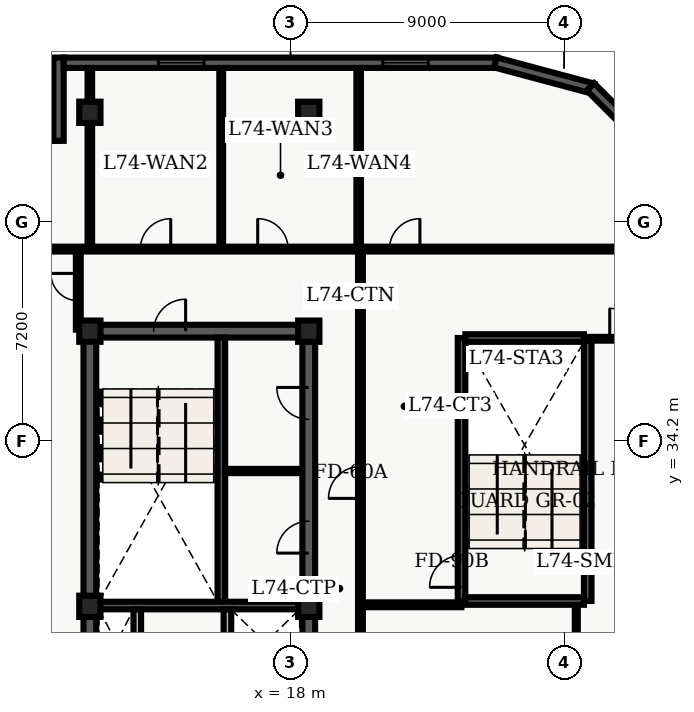
"""IFC4 building model, lengths in metres.
Left out: names, types, materials, properties, quantities, classifications, styles, units other than length and angle.
Written with IfcOpenShell. Run it as: python <this file> out.ifc"""

import sys

from ifc_helpers import new_model, entity, si_unit, converted_unit, direction, frame, origin_with_axes, origin_2d_with_axis, place, context, subcontext, project, spatial, polyline, rectangle, outline, extrude, element, fill, save


model = new_model("IFC4")
c1 = context("Model", 3, precision=1e-05, world=origin_with_axes(), true_north=direction((0.0, 1.0)))
c2 = subcontext(c1, "Body", "Model", "MODEL_VIEW")
j1 = project(units=[si_unit("LENGTHUNIT", "METRE"), converted_unit("PLANEANGLEUNIT", "DEGREE", entity("IfcPlaneAngleMeasure", 0.017), si_unit("PLANEANGLEUNIT", "RADIAN"), dimensions=[0, 0, 0, 0, 0, 0, 0])], contexts=[c1])
p1 = place(None, origin_with_axes())
s1 = spatial("IfcSite", under=j1, at=p1, CompositionType="ELEMENT")
p2 = place(p1, origin_with_axes())
s2 = spatial("IfcBuilding", under=s1, at=p2, CompositionType="ELEMENT")
p3 = place(p2, frame((0.0, 0.0, 299.7), z_axis=(0.0, 0.0, 1.0), x_axis=(1.0, 0.0, 0.0)))
s3 = spatial("IfcBuildingStorey", under=s2, at=p3, CompositionType="ELEMENT", Elevation=299.7)
p4 = place(p3, frame((11.4, 10.8, 0.0), z_axis=(0.0, 0.0, 1.0), x_axis=(0.0, 1.0, 0.0)))
e1 = element("IfcWall", 1, at=p4, inside=s3, PredefinedType="SHEAR", context=c2, shape_type="SweptSolid", body=[
    extrude(outline(polyline([(0.0, -0.21), (27.0, -0.21), (27.0, 0.21), (0.0, 0.21), (0.0, -0.21)])), origin_with_axes(), (0.0, 0.0, 1.0), 3.6),
])
p5 = place(p3, frame((11.4, 37.8, 0.0), z_axis=(0.0, 0.0, 1.0), x_axis=(1.0, 0.0, 0.0)))
e2 = element("IfcWall", 2, at=p5, inside=s3, PredefinedType="SHEAR", context=c2, shape_type="SweptSolid", body=[
    extrude(outline(polyline([(0.0, -0.21), (7.2, -0.21), (7.2, 0.21), (0.0, 0.21), (0.0, -0.21)])), origin_with_axes(), (0.0, 0.0, 1.0), 3.6),
])
p6 = place(p5, frame((2.625, 0.0, 0.0), z_axis=(0.0, 0.0, 1.0), x_axis=(1.0, 0.0, 0.0)))
e3 = element("IfcOpeningElement", 3, at=p6, cuts=e2, PredefinedType="OPENING", context=c2, shape_type="SweptSolid", body=[
    extrude(rectangle(XDim=1.05, YDim=0.44, at=origin_2d_with_axis()), origin_with_axes(), (0.0, 0.0, 1.0), 2.15),
])
p7 = place(p3, frame((18.6, 24.3, 0.0), z_axis=(0.0, 0.0, 1.0), x_axis=(0.0, 1.0, 0.0)))
e4 = element("IfcWall", 4, at=p7, inside=s3, PredefinedType="SHEAR", context=c2, shape_type="SweptSolid", body=[
    extrude(outline(polyline([(0.0, -0.21), (13.5, -0.21), (13.5, 0.21), (0.0, 0.21), (0.0, -0.21)])), origin_with_axes(), (0.0, 0.0, 1.0), 3.6),
])
p8 = place(p7, frame((6.725, 0.0, 0.0), z_axis=(0.0, 0.0, 1.0), x_axis=(1.0, 0.0, 0.0)))
e5 = element("IfcOpeningElement", 5, at=p8, cuts=e4, PredefinedType="OPENING", context=c2, shape_type="SweptSolid", body=[
    extrude(rectangle(XDim=1.05, YDim=0.44, at=origin_2d_with_axis()), origin_with_axes(), (0.0, 0.0, 1.0), 2.15),
])
p9 = place(p7, frame((11.125, 0.0, 0.0), z_axis=(0.0, 0.0, 1.0), x_axis=(1.0, 0.0, 0.0)))
e6 = element("IfcOpeningElement", 6, at=p9, cuts=e4, PredefinedType="OPENING", context=c2, shape_type="SweptSolid", body=[
    extrude(rectangle(XDim=1.05, YDim=0.44, at=origin_2d_with_axis()), origin_with_axes(), (0.0, 0.0, 1.0), 2.15),
])
p10 = place(p3, frame((15.725, 28.9, 0.0), z_axis=(0.0, 0.0, 1.0), x_axis=(0.0, 1.0, 0.0)))
e7 = element("IfcWall", 7, at=p10, inside=s3, PredefinedType="SHEAR", context=c2, shape_type="SweptSolid", body=[
    extrude(outline(polyline([(0.0, -0.125), (8.69, -0.125), (8.69, 0.125), (0.0, 0.125), (0.0, -0.125)])), origin_with_axes(), (0.0, 0.0, 1.0), 3.6),
])
p11 = place(p3, frame((11.61, 28.775, 0.0), z_axis=(0.0, 0.0, 1.0), x_axis=(1.0, 0.0, 0.0)))
e8 = element("IfcWall", 8, at=p11, inside=s3, PredefinedType="SHEAR", context=c2, shape_type="SweptSolid", body=[
    extrude(outline(polyline([(0.0, -0.125), (6.78, -0.125), (6.78, 0.125), (0.0, 0.125), (0.0, -0.125)])), origin_with_axes(), (0.0, 0.0, 1.0), 3.6),
])
for number, where, z_axis, x_axis in (
    (9, (12.96, 26.45, 0.0), (0.0, 0.0, 1.0), (0.0, 1.0, 0.0)),
    (10, (15.925, 26.45, 0.0), (0.0, 0.0, 1.0), (0.0, 1.0, 0.0)),
):
    element("IfcWall", number, at=place(p3, frame(where, z_axis=z_axis, x_axis=x_axis)), inside=s3, PredefinedType="SOLIDWALL", context=c2, shape_type="SweptSolid", body=[
        extrude(outline(polyline([(0.0, -0.125), (2.2, -0.125), (2.2, 0.125), (0.0, 0.125), (0.0, -0.125)])), origin_with_axes(), (0.0, 0.0, 1.0), 2.64),
    ])
p12 = place(p3, frame((23.625, 28.925, 0.0), z_axis=(0.0, 0.0, 1.0), x_axis=(0.0, 1.0, 0.0)))
e11 = element("IfcWall", 11, at=p12, inside=s3, PredefinedType="SHEAR", context=c2, shape_type="SweptSolid", body=[
    extrude(outline(polyline([(0.0, -0.125), (8.65, -0.125), (8.65, 0.125), (0.0, 0.125), (0.0, -0.125)])), origin_with_axes(), (0.0, 0.0, 1.0), 3.6),
])
p13 = place(p12, frame((0.975, 0.0, 0.0), z_axis=(0.0, 0.0, 1.0), x_axis=(1.0, 0.0, 0.0)))
e12 = element("IfcOpeningElement", 12, at=p13, cuts=e11, PredefinedType="OPENING", context=c2, shape_type="SweptSolid", body=[
    extrude(rectangle(XDim=1.05, YDim=0.27, at=origin_2d_with_axis()), origin_with_axes(), (0.0, 0.0, 1.0), 2.15),
])
p14 = place(p3, frame((27.775, 28.925, 0.0), z_axis=(0.0, 0.0, 1.0), x_axis=(0.0, 1.0, 0.0)))
e13 = element("IfcWall", 13, at=p14, inside=s3, PredefinedType="SHEAR", context=c2, shape_type="SweptSolid", body=[
    extrude(outline(polyline([(0.0, -0.125), (8.65, -0.125), (8.65, 0.125), (0.0, 0.125), (0.0, -0.125)])), origin_with_axes(), (0.0, 0.0, 1.0), 3.6),
])
for number, where, z_axis, x_axis in (
    (14, (23.75, 28.925, 0.0), (0.0, 0.0, 1.0), (1.0, 0.0, 0.0)),
    (15, (23.75, 37.575, 0.0), (0.0, 0.0, 1.0), (1.0, 0.0, 0.0)),
):
    element("IfcWall", number, at=place(p3, frame(where, z_axis=z_axis, x_axis=x_axis)), inside=s3, PredefinedType="SHEAR", context=c2, shape_type="SweptSolid", body=[
        extrude(outline(polyline([(0.0, -0.125), (3.9, -0.125), (3.9, 0.125), (0.0, 0.125), (0.0, -0.125)])), origin_with_axes(), (0.0, 0.0, 1.0), 3.6),
    ])
for number, where, z_axis, x_axis in (
    (16, (11.4, 28.75, 0.0), (0.0, 0.0, 1.0), (1.0, 0.0, 0.0)),
    (17, (11.4, 37.8, 0.0), (0.0, 0.0, 1.0), (1.0, 0.0, 0.0)),
    (18, (11.4, 45.0, 0.0), (0.0, 0.0, 1.0), (1.0, 0.0, 0.0)),
    (19, (18.6, 28.75, 0.0), (0.0, 0.0, 1.0), (1.0, 0.0, 0.0)),
    (20, (18.6, 37.8, 0.0), (0.0, 0.0, 1.0), (1.0, 0.0, 0.0)),
    (21, (18.6, 45.0, 0.0), (0.0, 0.0, 1.0), (1.0, 0.0, 0.0)),
):
    element("IfcColumn", number, at=place(p3, frame(where, z_axis=z_axis, x_axis=x_axis)), inside=s3, PredefinedType="COLUMN", context=c2, shape_type="SweptSolid", body=[
        extrude(rectangle(XDim=0.7, YDim=0.7, at=origin_2d_with_axis()), origin_with_axes(), (0.0, 0.0, 1.0), 3.9),
    ])
p15 = place(p3, frame((15.84, 33.2, 0.0), z_axis=(0.0, 0.0, 1.0), x_axis=(1.0, 0.0, 0.0)))
e22 = element("IfcWall", 22, at=p15, inside=s3, PredefinedType="PARTITIONING", context=c2, shape_type="SweptSolid", body=[
    extrude(outline(polyline([(0.0, -0.07), (2.46, -0.07), (2.46, 0.07), (0.0, 0.07), (0.0, -0.07)])), origin_with_axes(), (0.0, 0.0, 1.0), 2.64),
])
p16 = place(p3, frame((8.135, 40.5, 0.0), z_axis=(0.0, 0.0, 1.0), x_axis=(1.0, 0.0, 0.0)))
e23 = element("IfcWall", 23, at=p16, inside=s3, PredefinedType="PARTITIONING", context=c2, shape_type="SweptSolid", body=[
    extrude(outline(polyline([(0.0, -0.08), (22.715, -0.08), (22.715, 0.08), (0.0, 0.08), (0.0, -0.08)])), origin_with_axes(), (0.0, 0.0, 1.0), 2.64),
])
p17 = place(p16, frame((1.08, 0.0, 0.0), z_axis=(0.0, 0.0, 1.0), x_axis=(1.0, 0.0, 0.0)))
e24 = element("IfcOpeningElement", 24, at=p17, cuts=e23, PredefinedType="OPENING", context=c2, shape_type="SweptSolid", body=[
    extrude(rectangle(XDim=0.9, YDim=0.18, at=origin_2d_with_axis()), origin_with_axes(), (0.0, 0.0, 1.0), 2.15),
])
p18 = place(p16, frame((5.425, 0.0, 0.0), z_axis=(0.0, 0.0, 1.0), x_axis=(1.0, 0.0, 0.0)))
e25 = element("IfcOpeningElement", 25, at=p18, cuts=e23, PredefinedType="OPENING", context=c2, shape_type="SweptSolid", body=[
    extrude(rectangle(XDim=1.0, YDim=0.18, at=origin_2d_with_axis()), origin_with_axes(), (0.0, 0.0, 1.0), 2.15),
])
p19 = place(p16, frame((9.286, 0.0, 0.0), z_axis=(0.0, 0.0, 1.0), x_axis=(1.0, 0.0, 0.0)))
e26 = element("IfcOpeningElement", 26, at=p19, cuts=e23, PredefinedType="OPENING", context=c2, shape_type="SweptSolid", body=[
    extrude(rectangle(XDim=1.0, YDim=0.18, at=origin_2d_with_axis()), origin_with_axes(), (0.0, 0.0, 1.0), 2.15),
])
p20 = place(p16, frame((13.621, 0.0, 0.0), z_axis=(0.0, 0.0, 1.0), x_axis=(1.0, 0.0, 0.0)))
e27 = element("IfcOpeningElement", 27, at=p20, cuts=e23, PredefinedType="OPENING", context=c2, shape_type="SweptSolid", body=[
    extrude(rectangle(XDim=1.0, YDim=0.18, at=origin_2d_with_axis()), origin_with_axes(), (0.0, 0.0, 1.0), 2.15),
])
p21 = place(p3, frame((20.3, 2.14, 0.0), z_axis=(0.0, 0.0, 1.0), x_axis=(0.0, 1.0, 0.0)))
e28 = element("IfcWall", 28, at=p21, inside=s3, PredefinedType="PARTITIONING", context=c2, shape_type="SweptSolid", body=[
    extrude(outline(polyline([(0.0, -0.08), (38.36, -0.08), (38.36, 0.08), (0.0, 0.08), (0.0, -0.08)])), origin_with_axes(), (0.0, 0.0, 1.0), 2.64),
])
p22 = place(p21, frame((30.685, 0.0, 0.0), z_axis=(0.0, 0.0, 1.0), x_axis=(1.0, 0.0, 0.0)))
e29 = element("IfcOpeningElement", 29, at=p22, cuts=e28, PredefinedType="OPENING", context=c2, shape_type="SweptSolid", body=[
    extrude(rectangle(XDim=1.05, YDim=0.18, at=origin_2d_with_axis()), origin_with_axes(), (0.0, 0.0, 1.0), 2.15),
])
p23 = place(p21, frame((2.683, 0.0, 0.0), z_axis=(0.0, 0.0, 1.0), x_axis=(1.0, 0.0, 0.0)))
e30 = element("IfcOpeningElement", 30, at=p23, cuts=e28, PredefinedType="OPENING", context=c2, shape_type="SweptSolid", body=[
    extrude(rectangle(XDim=1.0, YDim=0.18, at=origin_2d_with_axis()), origin_with_axes(), (0.0, 0.0, 1.0), 2.15),
])
p24 = place(p21, frame((9.919, 0.0, 0.0), z_axis=(0.0, 0.0, 1.0), x_axis=(1.0, 0.0, 0.0)))
e31 = element("IfcOpeningElement", 31, at=p24, cuts=e28, PredefinedType="OPENING", context=c2, shape_type="SweptSolid", body=[
    extrude(rectangle(XDim=1.0, YDim=0.18, at=origin_2d_with_axis()), origin_with_axes(), (0.0, 0.0, 1.0), 2.15),
])
p25 = place(p21, frame((14.175, 0.0, 0.0), z_axis=(0.0, 0.0, 1.0), x_axis=(1.0, 0.0, 0.0)))
e32 = element("IfcOpeningElement", 32, at=p25, cuts=e28, PredefinedType="OPENING", context=c2, shape_type="SweptSolid", body=[
    extrude(rectangle(XDim=1.0, YDim=0.18, at=origin_2d_with_axis()), origin_with_axes(), (0.0, 0.0, 1.0), 2.15),
])
p26 = place(p21, frame((23.364, 0.0, 0.0), z_axis=(0.0, 0.0, 1.0), x_axis=(1.0, 0.0, 0.0)))
e33 = element("IfcOpeningElement", 33, at=p26, cuts=e28, PredefinedType="OPENING", context=c2, shape_type="SweptSolid", body=[
    extrude(rectangle(XDim=1.0, YDim=0.18, at=origin_2d_with_axis()), origin_with_axes(), (0.0, 0.0, 1.0), 2.15),
])
p27 = place(p3, frame((20.3, 28.8, 0.0), z_axis=(0.0, 0.0, 1.0), x_axis=(1.0, 0.0, 0.0)))
e34 = element("IfcWall", 34, at=p27, inside=s3, PredefinedType="PARTITIONING", context=c2, shape_type="SweptSolid", body=[
    extrude(outline(polyline([(0.0, -0.08), (3.32, -0.08), (3.32, 0.08), (0.0, 0.08), (0.0, -0.08)])), origin_with_axes(), (0.0, 0.0, 1.0), 2.64),
])
p28 = place(p3, frame((11.02, 37.85, 0.0), z_axis=(0.0, 0.0, 1.0), x_axis=(0.0, 1.0, 0.0)))
e35 = element("IfcWall", 35, at=p28, inside=s3, PredefinedType="PARTITIONING", context=c2, shape_type="SweptSolid", body=[
    extrude(outline(polyline([(0.0, -0.08), (2.65, -0.08), (2.65, 0.08), (0.0, 0.08), (0.0, -0.08)])), origin_with_axes(), (0.0, 0.0, 1.0), 2.64),
])
p29 = place(p28, frame((1.4, 0.0, 0.0), z_axis=(0.0, 0.0, 1.0), x_axis=(1.0, 0.0, 0.0)))
e36 = element("IfcOpeningElement", 36, at=p29, cuts=e35, PredefinedType="OPENING", context=c2, shape_type="SweptSolid", body=[
    extrude(rectangle(XDim=0.9, YDim=0.18, at=origin_2d_with_axis()), origin_with_axes(), (0.0, 0.0, 1.0), 2.15),
])
p30 = place(p3, frame((11.4, 40.6, 0.0), z_axis=(0.0, 0.0, 1.0), x_axis=(0.0, 1.0, 0.0)))
e37 = element("IfcWall", 37, at=p30, inside=s3, PredefinedType="PARTITIONING", context=c2, shape_type="SweptSolid", body=[
    extrude(outline(polyline([(0.0, -0.075), (5.865, -0.075), (5.865, 0.075), (0.0, 0.075), (0.0, -0.075)])), origin_with_axes(), (0.0, 0.0, 1.0), 2.64),
])
p31 = place(p3, frame((15.72, 40.6, 0.0), z_axis=(0.0, 0.0, 1.0), x_axis=(0.0, 1.0, 0.0)))
e38 = element("IfcWall", 38, at=p31, inside=s3, PredefinedType="PARTITIONING", context=c2, shape_type="SweptSolid", body=[
    extrude(outline(polyline([(0.0, -0.062), (5.865, -0.062), (5.865, 0.062), (0.0, 0.062), (0.0, -0.062)])), origin_with_axes(), (0.0, 0.0, 1.0), 2.64),
])
p32 = place(p3, frame((20.242, 40.6, 0.0), z_axis=(0.0, 0.0, 1.0), x_axis=(0.0, 1.0, 0.0)))
e39 = element("IfcWall", 39, at=p32, inside=s3, PredefinedType="PARTITIONING", context=c2, shape_type="SweptSolid", body=[
    extrude(outline(polyline([(0.0, -0.075), (5.865, -0.075), (5.865, 0.075), (0.0, 0.075), (0.0, -0.075)])), origin_with_axes(), (0.0, 0.0, 1.0), 2.64),
])
p33 = place(p3, frame((27.4, 2.135, 0.0), z_axis=(0.0, 0.0, 1.0), x_axis=(0.0, 1.0, 0.0)))
e40 = element("IfcWall", 40, at=p33, inside=s3, PredefinedType="PARTITIONING", context=c2, shape_type="SweptSolid", body=[
    extrude(outline(polyline([(0.0, -0.05), (26.515, -0.05), (26.515, 0.05), (0.0, 0.05), (0.0, -0.05)])), origin_with_axes(), (0.0, 0.0, 1.0), 2.64),
])
p34 = place(p33, frame((2.408, 0.0, 0.0), z_axis=(0.0, 0.0, 1.0), x_axis=(1.0, 0.0, 0.0)))
e41 = element("IfcOpeningElement", 41, at=p34, cuts=e40, PredefinedType="OPENING", context=c2, shape_type="SweptSolid", body=[
    extrude(rectangle(XDim=0.95, YDim=0.12, at=origin_2d_with_axis()), origin_with_axes(), (0.0, 0.0, 1.0), 2.15),
])
p35 = place(p33, frame((6.894, 0.0, 0.0), z_axis=(0.0, 0.0, 1.0), x_axis=(1.0, 0.0, 0.0)))
e42 = element("IfcOpeningElement", 42, at=p35, cuts=e40, PredefinedType="OPENING", context=c2, shape_type="SweptSolid", body=[
    extrude(rectangle(XDim=0.95, YDim=0.12, at=origin_2d_with_axis()), origin_with_axes(), (0.0, 0.0, 1.0), 2.15),
])
p36 = place(p33, frame((13.901, 0.0, 0.0), z_axis=(0.0, 0.0, 1.0), x_axis=(1.0, 0.0, 0.0)))
e43 = element("IfcOpeningElement", 43, at=p36, cuts=e40, PredefinedType="OPENING", context=c2, shape_type="SweptSolid", body=[
    extrude(rectangle(XDim=0.95, YDim=0.12, at=origin_2d_with_axis()), origin_with_axes(), (0.0, 0.0, 1.0), 2.15),
])
p37 = place(p33, frame((22.119, 0.0, 0.0), z_axis=(0.0, 0.0, 1.0), x_axis=(1.0, 0.0, 0.0)))
e44 = element("IfcOpeningElement", 44, at=p37, cuts=e40, PredefinedType="OPENING", context=c2, shape_type="SweptSolid", body=[
    extrude(rectangle(XDim=0.95, YDim=0.12, at=origin_2d_with_axis()), origin_with_axes(), (0.0, 0.0, 1.0), 2.15),
])
p38 = place(p3, frame((27.85, 37.55, 0.0), z_axis=(0.0, 0.0, 1.0), x_axis=(1.0, 0.0, 0.0)))
e45 = element("IfcWall", 45, at=p38, inside=s3, PredefinedType="PARTITIONING", context=c2, shape_type="SweptSolid", body=[
    extrude(outline(polyline([(0.0, -0.062), (3.015, -0.062), (3.015, 0.062), (0.0, 0.062), (0.0, -0.062)])), origin_with_axes(), (0.0, 0.0, 1.0), 2.64),
])
p39 = place(p38, frame((1.15, 0.0, 0.0), z_axis=(0.0, 0.0, 1.0), x_axis=(1.0, 0.0, 0.0)))
e46 = element("IfcOpeningElement", 46, at=p39, cuts=e45, PredefinedType="OPENING", context=c2, shape_type="SweptSolid", body=[
    extrude(rectangle(XDim=1.0, YDim=0.145, at=origin_2d_with_axis()), origin_with_axes(), (0.0, 0.0, 1.0), 2.15),
])
p40 = place(p3, frame((8.14, 44.23, 0.0), z_axis=(0.0, 0.0, 1.0), x_axis=(1.0, 0.0, 0.0)))
e47 = element("IfcWall", 47, at=p40, inside=s3, PredefinedType="SOLIDWALL", context=c2, shape_type="SweptSolid", body=[
    extrude(outline(polyline([(0.0, -0.17), (2.06, -0.17), (2.06, 0.17), (0.0, 0.17), (0.0, -0.17)])), origin_with_axes(), (0.0, 0.0, 1.0), 3.6),
])
p41 = place(p3, frame((10.37, 44.06, 0.0), z_axis=(0.0, 0.0, 1.0), x_axis=(0.0, 1.0, 0.0)))
e48 = element("IfcWall", 48, at=p41, inside=s3, PredefinedType="SOLIDWALL", context=c2, shape_type="SweptSolid", body=[
    extrude(outline(polyline([(0.0, -0.17), (2.74, -0.17), (2.74, 0.17), (0.0, 0.17), (0.0, -0.17)])), origin_with_axes(), (0.0, 0.0, 1.0), 3.6),
])
p42 = place(p3, frame((10.54, 46.63, 0.0), z_axis=(0.0, 0.0, 1.0), x_axis=(1.0, 0.0, 0.0)))
e49 = element("IfcWall", 49, at=p42, inside=s3, PredefinedType="SOLIDWALL", context=c2, shape_type="SweptSolid", body=[
    extrude(outline(polyline([(0.0, -0.17), (14.26, -0.17), (14.26, 0.17), (0.0, 0.17), (0.0, -0.17)])), origin_with_axes(), (0.0, 0.0, 1.0), 3.6),
])
p43 = place(p42, frame((3.865, 0.0, 0.45), z_axis=(0.0, 0.0, 1.0), x_axis=(1.0, 0.0, 0.0)))
e50 = element("IfcOpeningElement", 50, at=p43, cuts=e49, PredefinedType="OPENING", context=c2, shape_type="SweptSolid", body=[
    extrude(rectangle(XDim=1.5, YDim=0.36, at=origin_2d_with_axis()), origin_with_axes(), (0.0, 0.0, 1.0), 2.1),
])
p44 = place(p42, frame((11.245, 0.0, 0.45), z_axis=(0.0, 0.0, 1.0), x_axis=(1.0, 0.0, 0.0)))
e51 = element("IfcOpeningElement", 51, at=p44, cuts=e49, PredefinedType="OPENING", context=c2, shape_type="SweptSolid", body=[
    extrude(rectangle(XDim=1.5, YDim=0.36, at=origin_2d_with_axis()), origin_with_axes(), (0.0, 0.0, 1.0), 2.1),
])
p45 = place(p3, frame((24.737, 46.641, 0.0), z_axis=(0.0, 0.0, 1.0), x_axis=(0.965965, -0.258671, 0.0)))
e52 = element("IfcWall", 52, at=p45, inside=s3, PredefinedType="SOLIDWALL", context=c2, shape_type="SweptSolid", body=[
    extrude(outline(polyline([(0.0, -0.17), (3.332, -0.17), (3.332, 0.17), (0.0, 0.17), (0.0, -0.17)])), origin_with_axes(), (0.0, 0.0, 1.0), 3.6),
])
p46 = place(p3, frame((27.866, 45.837, 0.0), z_axis=(0.0, 0.0, 1.0), x_axis=(0.707107, -0.707107, 0.0)))
e53 = element("IfcWall", 53, at=p46, inside=s3, PredefinedType="SOLIDWALL", context=c2, shape_type="SweptSolid", body=[
    extrude(outline(polyline([(0.0, -0.17), (3.333, -0.17), (3.333, 0.17), (0.0, 0.17), (0.0, -0.17)])), origin_with_axes(), (0.0, 0.0, 1.0), 3.6),
])
p47 = place(p5, frame((2.625, 0.0, 0.0), z_axis=(0.0, 0.0, 1.0), x_axis=(1.0, 0.0, 0.0)))
e54 = element("IfcDoor", 54, at=p47, inside=s3, OperationType="SINGLE_SWING_RIGHT", PredefinedType="DOOR", context=c2, shape_type="SweptSolid", body=[
    extrude(rectangle(XDim=1.05, YDim=0.09, at=origin_2d_with_axis()), origin_with_axes(), (0.0, 0.0, 1.0), 2.15),
])
fill(e3, e54)
p48 = place(p7, frame((6.725, 0.0, 0.0), z_axis=(0.0, 0.0, 1.0), x_axis=(1.0, 0.0, 0.0)))
e55 = element("IfcDoor", 55, at=p48, inside=s3, OperationType="SINGLE_SWING_LEFT", PredefinedType="DOOR", context=c2, shape_type="SweptSolid", body=[
    extrude(rectangle(XDim=1.05, YDim=0.09, at=origin_2d_with_axis()), origin_with_axes(), (0.0, 0.0, 1.0), 2.15),
])
fill(e5, e55)
p49 = place(p7, frame((11.125, 0.0, 0.0), z_axis=(0.0, 0.0, 1.0), x_axis=(1.0, 0.0, 0.0)))
e56 = element("IfcDoor", 56, at=p49, inside=s3, OperationType="SINGLE_SWING_RIGHT", PredefinedType="DOOR", context=c2, shape_type="SweptSolid", body=[
    extrude(rectangle(XDim=1.05, YDim=0.09, at=origin_2d_with_axis()), origin_with_axes(), (0.0, 0.0, 1.0), 2.15),
])
fill(e6, e56)
p50 = place(p12, frame((0.975, 0.0, 0.0), z_axis=(0.0, 0.0, 1.0), x_axis=(1.0, 0.0, 0.0)))
e57 = element("IfcDoor", 57, at=p50, inside=s3, OperationType="SINGLE_SWING_LEFT", PredefinedType="DOOR", context=c2, shape_type="SweptSolid", body=[
    extrude(rectangle(XDim=1.05, YDim=0.09, at=origin_2d_with_axis()), origin_with_axes(), (0.0, 0.0, 1.0), 2.15),
])
fill(e12, e57)
p51 = place(p21, frame((30.685, 0.0, 0.0), z_axis=(0.0, 0.0, 1.0), x_axis=(1.0, 0.0, 0.0)))
e58 = element("IfcDoor", 58, at=p51, inside=s3, OperationType="SINGLE_SWING_LEFT", PredefinedType="DOOR", context=c2, shape_type="SweptSolid", body=[
    extrude(rectangle(XDim=1.05, YDim=0.09, at=origin_2d_with_axis()), origin_with_axes(), (0.0, 0.0, 1.0), 2.15),
])
fill(e29, e58)
p52 = place(p28, frame((1.4, 0.0, 0.0), z_axis=(0.0, 0.0, 1.0), x_axis=(1.0, 0.0, 0.0)))
e59 = element("IfcDoor", 59, at=p52, inside=s3, OperationType="SINGLE_SWING_RIGHT", PredefinedType="DOOR", context=c2, shape_type="SweptSolid", body=[
    extrude(rectangle(XDim=0.9, YDim=0.09, at=origin_2d_with_axis()), origin_with_axes(), (0.0, 0.0, 1.0), 2.15),
])
fill(e36, e59)
p53 = place(p16, frame((5.425, 0.0, 0.0), z_axis=(0.0, 0.0, 1.0), x_axis=(1.0, 0.0, 0.0)))
e60 = element("IfcDoor", 60, at=p53, inside=s3, OperationType="SINGLE_SWING_RIGHT", PredefinedType="DOOR", context=c2, shape_type="SweptSolid", body=[
    extrude(rectangle(XDim=1.0, YDim=0.09, at=origin_2d_with_axis()), origin_with_axes(), (0.0, 0.0, 1.0), 2.15),
])
fill(e25, e60)
p54 = place(p16, frame((9.286, 0.0, 0.0), z_axis=(0.0, 0.0, 1.0), x_axis=(1.0, 0.0, 0.0)))
e61 = element("IfcDoor", 61, at=p54, inside=s3, OperationType="SINGLE_SWING_LEFT", PredefinedType="DOOR", context=c2, shape_type="SweptSolid", body=[
    extrude(rectangle(XDim=1.0, YDim=0.09, at=origin_2d_with_axis()), origin_with_axes(), (0.0, 0.0, 1.0), 2.15),
])
fill(e26, e61)
p55 = place(p16, frame((13.621, 0.0, 0.0), z_axis=(0.0, 0.0, 1.0), x_axis=(1.0, 0.0, 0.0)))
e62 = element("IfcDoor", 62, at=p55, inside=s3, OperationType="SINGLE_SWING_RIGHT", PredefinedType="DOOR", context=c2, shape_type="SweptSolid", body=[
    extrude(rectangle(XDim=1.0, YDim=0.09, at=origin_2d_with_axis()), origin_with_axes(), (0.0, 0.0, 1.0), 2.15),
])
fill(e27, e62)
p56 = place(p38, frame((1.15, 0.0, 0.0), z_axis=(0.0, 0.0, 1.0), x_axis=(1.0, 0.0, 0.0)))
e63 = element("IfcDoor", 63, at=p56, inside=s3, OperationType="SINGLE_SWING_LEFT", PredefinedType="DOOR", context=c2, shape_type="SweptSolid", body=[
    extrude(rectangle(XDim=1.0, YDim=0.075, at=origin_2d_with_axis()), origin_with_axes(), (0.0, 0.0, 1.0), 2.15),
])
fill(e46, e63)
p57 = place(p42, frame((3.865, 0.0, 0.45), z_axis=(0.0, 0.0, 1.0), x_axis=(1.0, 0.0, 0.0)))
e64 = element("IfcWindow", 64, at=p57, inside=s3, PredefinedType="WINDOW", context=c2, shape_type="SweptSolid", body=[
    extrude(rectangle(XDim=1.5, YDim=0.09, at=origin_2d_with_axis()), origin_with_axes(), (0.0, 0.0, 1.0), 2.1),
])
fill(e50, e64)
p58 = place(p42, frame((11.245, 0.0, 0.45), z_axis=(0.0, 0.0, 1.0), x_axis=(1.0, 0.0, 0.0)))
e65 = element("IfcWindow", 65, at=p58, inside=s3, PredefinedType="WINDOW", context=c2, shape_type="SweptSolid", body=[
    extrude(rectangle(XDim=1.5, YDim=0.09, at=origin_2d_with_axis()), origin_with_axes(), (0.0, 0.0, 1.0), 2.1),
])
fill(e51, e65)
save(model, sys.argv[1])
